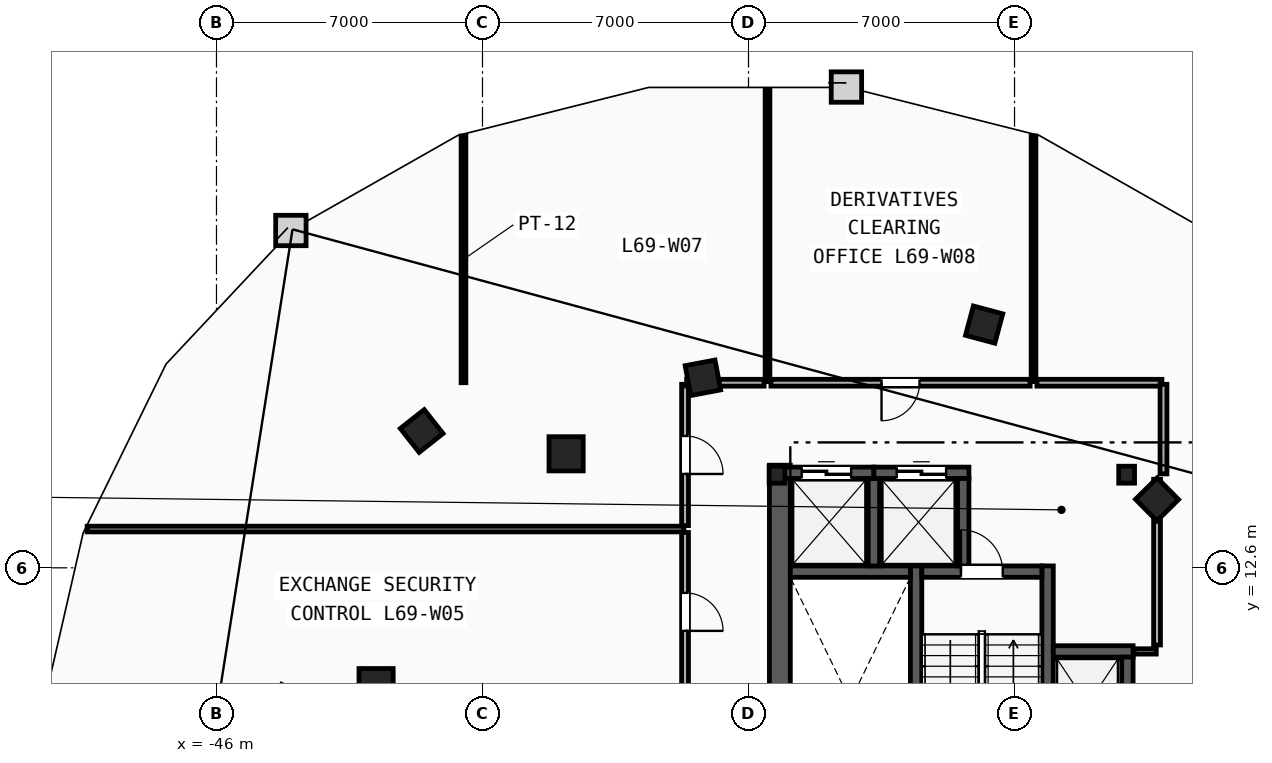
"""IFC4 building model, lengths in metres.
Left out: names, types, materials, properties, quantities, classifications, styles, units other than length and angle.
Written with IfcOpenShell. Run it as: python <this file> out.ifc"""

import sys

from ifc_helpers import new_model, si_unit, direction, frame, frame_2d, origin, origin_2d, place, context, subcontext, project, spatial, rectangle, i_section, extrude, element, fill, save


model = new_model("IFC4")
c1 = context("Model", 3, precision=1e-05, world=origin(), true_north=direction((0.0, 1.0)))
c2 = subcontext(c1, "Body", "Model", "MODEL_VIEW")
j1 = project(units=[si_unit("LENGTHUNIT", "METRE"), si_unit("PLANEANGLEUNIT", "RADIAN")], contexts=[c1])
p1 = place(None, origin())
s1 = spatial("IfcSite", under=j1, at=p1, CompositionType="ELEMENT")
p2 = place(p1, origin())
s2 = spatial("IfcBuilding", under=s1, at=p2, CompositionType="ELEMENT")
p3 = place(p2, frame((0.0, 0.0, 261.2)))
s3 = spatial("IfcBuildingStorey", under=s2, at=p3, CompositionType="ELEMENT", Elevation=261.2)
for number, where, z_axis, x_axis in (
    (1, (-22.05, 15.05, 0.0), (0.0, 0.0, 1.0), (1.0, 0.0, 0.0)),
    (2, (-31.25, 15.05, 0.0), (0.0, 0.0, 1.0), (1.0, 0.0, 0.0)),
):
    element("IfcColumn", number, at=place(p3, frame(where, z_axis=z_axis, x_axis=x_axis)), inside=s3, PredefinedType="COLUMN", context=c2, shape_type="SweptSolid", body=[
        extrude(i_section(OverallWidth=0.416, OverallDepth=0.446, WebThickness=0.039, FlangeThickness=0.063, FilletRadius=0.018, at=origin_2d()), origin(), (0.0, 0.0, 1.0), 3.6),
    ])
for number, where, z_axis, x_axis in (
    (3, (-41.8, 9.5, 0.0), (0.0, 0.0, 1.0), (1.0, 0.0, 0.0)),
    (4, (-36.8, 15.6, 0.0), (0.0, 0.0, 1.0), (1.0, 0.0, 0.0)),
):
    element("IfcColumn", number, at=place(p3, frame(where, z_axis=z_axis, x_axis=x_axis)), inside=s3, PredefinedType="COLUMN", context=c2, shape_type="SweptSolid", body=[
        extrude(rectangle(XDim=0.9, YDim=0.9, at=origin_2d()), origin(), (0.0, 0.0, 1.0), 3.6),
    ])
for number, where, z_axis, x_axis in (
    (5, (-21.25, 14.4, 0.0), (0.0, 0.0, 1.0), (-0.703, 0.711, 0.0)),
    (6, (-25.8, 19.0, 0.0), (0.0, 0.0, 1.0), (-0.966, 0.259, 0.0)),
    (7, (-33.2, 17.6, 0.0), (0.0, 0.0, 1.0), (-0.983, -0.186, 0.0)),
    (8, (-40.6, 16.2, 0.0), (0.0, 0.0, 1.0), (-0.785, -0.619, 0.0)),
):
    element("IfcColumn", number, at=place(p3, frame(where, z_axis=z_axis, x_axis=x_axis)), inside=s3, PredefinedType="COLUMN", context=c2, shape_type="SweptSolid", body=[
        extrude(rectangle(XDim=0.8, YDim=0.8, at=origin_2d()), origin(), (0.0, 0.0, 1.0), 3.6),
    ])
p4 = place(p3, frame((-31.175, 1.97, 0.0), z_axis=(0.0, 0.0, 1.0), x_axis=(0.0, 1.0, 0.0)))
e9 = element("IfcWall", 9, at=p4, inside=s3, PredefinedType="SHEAR", context=c2, shape_type="SweptSolid", body=[
    extrude(rectangle(XDim=13.33, YDim=0.55, at=frame_2d((6.665, 0.0))), origin(), (0.0, 0.0, 1.0), 3.34),
])
for number, where, z_axis, x_axis in (
    (10, (-27.59, 1.97, 0.0), (0.0, 0.0, 1.0), (0.0, 1.0, 0.0)),
    (11, (-24.13, 1.97, 0.0), (0.0, 0.0, 1.0), (0.0, 1.0, 0.0)),
):
    element("IfcWall", number, at=place(p3, frame(where, z_axis=z_axis, x_axis=x_axis)), inside=s3, PredefinedType="SHEAR", context=c2, shape_type="SweptSolid", body=[
        extrude(rectangle(XDim=10.68, YDim=0.3, at=frame_2d((5.34, 0.0))), origin(), (0.0, 0.0, 1.0), 3.34),
    ])
p5 = place(p3, frame((-30.9, 12.5, 0.0), z_axis=(0.0, 0.0, 1.0), x_axis=(1.0, 0.0, 0.0)))
e12 = element("IfcWall", 12, at=p5, inside=s3, PredefinedType="SHEAR", context=c2, shape_type="SweptSolid", body=[
    extrude(rectangle(XDim=3.16, YDim=0.3, at=frame_2d((1.58, 0.0))), origin(), (0.0, 0.0, 1.0), 3.34),
])
p6 = place(p3, frame((-27.44, 12.5, 0.0), z_axis=(0.0, 0.0, 1.0), x_axis=(1.0, 0.0, 0.0)))
e13 = element("IfcWall", 13, at=p6, inside=s3, PredefinedType="SHEAR", context=c2, shape_type="SweptSolid", body=[
    extrude(rectangle(XDim=3.16, YDim=0.3, at=frame_2d((1.58, 0.0))), origin(), (0.0, 0.0, 1.0), 3.34),
])
p7 = place(p6, frame((1.03, 0.0, 0.0)))
e14 = element("IfcOpeningElement", 14, at=p7, cuts=e13, PredefinedType="OPENING", context=c2, shape_type="SweptSolid", body=[
    extrude(rectangle(XDim=1.1, YDim=2.15, at=frame_2d((0.55, 1.075))), frame((0.0, 0.16, 0.0), z_axis=(0.0, -1.0, 0.0), x_axis=(1.0, 0.0, 0.0)), (0.0, 0.0, 1.0), 0.32),
])
p8 = place(p3, frame((-23.98, 10.4, 0.0), z_axis=(0.0, 0.0, 1.0), x_axis=(1.0, 0.0, 0.0)))
e15 = element("IfcWall", 15, at=p8, inside=s3, PredefinedType="SHEAR", context=c2, shape_type="SweptSolid", body=[
    extrude(rectangle(XDim=2.1, YDim=0.3, at=frame_2d((1.05, 0.0))), origin(), (0.0, 0.0, 1.0), 3.34),
])
p9 = place(p3, frame((-22.03, 7.75, 0.0), z_axis=(0.0, 0.0, 1.0), x_axis=(0.0, 1.0, 0.0)))
e16 = element("IfcWall", 16, at=p9, inside=s3, PredefinedType="SHEAR", context=c2, shape_type="SweptSolid", body=[
    extrude(rectangle(XDim=2.5, YDim=0.3, at=frame_2d((1.25, 0.0))), origin(), (0.0, 0.0, 1.0), 3.34),
])
p10 = place(p3, frame((-31.2, 15.1, 0.0), z_axis=(0.0, 0.0, 1.0), x_axis=(1.0, 0.0, 0.0)))
e17 = element("IfcWall", 17, at=p10, inside=s3, PredefinedType="SHEAR", context=c2, shape_type="SweptSolid", body=[
    extrude(rectangle(XDim=2.5, YDim=0.3, at=frame_2d((1.25, 0.0))), origin(), (0.0, 0.0, 1.0), 3.34),
])
p11 = place(p10, frame((0.6, 0.0, 0.0)))
e18 = element("IfcOpeningElement", 18, at=p11, cuts=e17, PredefinedType="OPENING", context=c2, shape_type="SweptSolid", body=[
    extrude(rectangle(XDim=1.3, YDim=2.2, at=frame_2d((0.65, 1.1))), frame((0.0, 0.16, 0.0), z_axis=(0.0, -1.0, 0.0), x_axis=(1.0, 0.0, 0.0)), (0.0, 0.0, 1.0), 0.32),
])
p12 = place(p3, frame((-28.7, 12.65, 0.0), z_axis=(0.0, 0.0, 1.0), x_axis=(0.0, 1.0, 0.0)))
e19 = element("IfcWall", 19, at=p12, inside=s3, PredefinedType="SHEAR", context=c2, shape_type="SweptSolid", body=[
    extrude(rectangle(XDim=2.3, YDim=0.3, at=frame_2d((1.15, 0.0))), origin(), (0.0, 0.0, 1.0), 3.34),
])
p13 = place(p3, frame((-28.7, 15.1, 0.0), z_axis=(0.0, 0.0, 1.0), x_axis=(1.0, 0.0, 0.0)))
e20 = element("IfcWall", 20, at=p13, inside=s3, PredefinedType="SHEAR", context=c2, shape_type="SweptSolid", body=[
    extrude(rectangle(XDim=2.5, YDim=0.3, at=frame_2d((1.25, 0.0))), origin(), (0.0, 0.0, 1.0), 3.34),
])
p14 = place(p13, frame((0.6, 0.0, 0.0)))
e21 = element("IfcOpeningElement", 21, at=p14, cuts=e20, PredefinedType="OPENING", context=c2, shape_type="SweptSolid", body=[
    extrude(rectangle(XDim=1.3, YDim=2.2, at=frame_2d((0.65, 1.1))), frame((0.0, 0.16, 0.0), z_axis=(0.0, -1.0, 0.0), x_axis=(1.0, 0.0, 0.0)), (0.0, 0.0, 1.0), 0.32),
])
p15 = place(p3, frame((-26.35, 12.65, 0.0), z_axis=(0.0, 0.0, 1.0), x_axis=(0.0, 1.0, 0.0)))
e22 = element("IfcWall", 22, at=p15, inside=s3, PredefinedType="SHEAR", context=c2, shape_type="SweptSolid", body=[
    extrude(rectangle(XDim=2.3, YDim=0.3, at=frame_2d((1.15, 0.0))), origin(), (0.0, 0.0, 1.0), 3.34),
])
p16 = place(p3, frame((-21.86, 10.4, 0.0), z_axis=(0.0, 0.0, 1.0), x_axis=(1.0, 0.0, 0.0)))
e23 = element("IfcWall", 23, at=p16, inside=s3, PredefinedType="PARTITIONING", context=c2, shape_type="SweptSolid", body=[
    extrude(rectangle(XDim=0.59, YDim=0.14, at=frame_2d((0.295, 0.0))), origin(), (0.0, 0.0, 1.0), 3.34),
])
p17 = place(p3, frame((-21.25, 10.57, 0.0), z_axis=(0.0, 0.0, 1.0), x_axis=(0.0, 1.0, 0.0)))
e24 = element("IfcWall", 24, at=p17, inside=s3, PredefinedType="PARTITIONING", context=c2, shape_type="SweptSolid", body=[
    extrude(rectangle(XDim=4.36, YDim=0.18, at=frame_2d((2.18, 0.0))), origin(), (0.0, 0.0, 1.0), 3.34),
])
p18 = place(p3, frame((-49.404, 13.62, 0.0), z_axis=(0.0, 0.0, 1.0), x_axis=(1.0, 0.0, 0.0)))
e25 = element("IfcWall", 25, at=p18, inside=s3, PredefinedType="PARTITIONING", context=c2, shape_type="SweptSolid", body=[
    extrude(rectangle(XDim=15.704, YDim=0.15, at=frame_2d((7.852, 0.0))), origin(), (0.0, 0.0, 1.0), 3.34),
])
p19 = place(p3, frame((-39.5, 17.47, 0.0), z_axis=(0.0, 0.0, 1.0), x_axis=(0.0, 1.0, 0.0)))
e26 = element("IfcWall", 26, at=p19, inside=s3, PredefinedType="PARTITIONING", context=c2, shape_type="SweptSolid", body=[
    extrude(rectangle(XDim=6.493, YDim=0.125, at=frame_2d((3.246, 0.0))), origin(), (0.0, 0.0, 1.0), 3.34),
])
p20 = place(p3, frame((-31.5, 17.5, 0.0), z_axis=(0.0, 0.0, 1.0), x_axis=(0.0, 1.0, 0.0)))
e27 = element("IfcWall", 27, at=p20, inside=s3, PredefinedType="PARTITIONING", context=c2, shape_type="SweptSolid", body=[
    extrude(rectangle(XDim=7.69, YDim=0.125, at=frame_2d((3.845, 0.0))), origin(), (0.0, 0.0, 1.0), 3.34),
])
p21 = place(p3, frame((-24.5, 17.5, 0.0), z_axis=(0.0, 0.0, 1.0), x_axis=(0.0, 1.0, 0.0)))
e28 = element("IfcWall", 28, at=p21, inside=s3, PredefinedType="PARTITIONING", context=c2, shape_type="SweptSolid", body=[
    extrude(rectangle(XDim=6.463, YDim=0.125, at=frame_2d((3.231, 0.0))), origin(), (0.0, 0.0, 1.0), 3.34),
])
p22 = place(p3, frame((-33.67, 13.53, 0.0), z_axis=(0.0, 0.0, 1.0), x_axis=(0.0, -1.0, 0.0)))
e29 = element("IfcWall", 29, at=p22, inside=s3, PredefinedType="PARTITIONING", context=c2, shape_type="SweptSolid", body=[
    extrude(rectangle(XDim=4.179, YDim=0.18, at=frame_2d((2.089, 0.0))), origin(), (0.0, 0.0, 1.0), 3.34),
])
p23 = place(p22, frame((1.589, 0.0, 0.0)))
e30 = element("IfcOpeningElement", 30, at=p23, cuts=e29, PredefinedType="OPENING", context=c2, shape_type="SweptSolid", body=[
    extrude(rectangle(XDim=1.0, YDim=2.15, at=frame_2d((0.5, 1.075))), frame((0.0, 0.1, 0.0), z_axis=(0.0, -1.0, 0.0), x_axis=(1.0, 0.0, 0.0)), (0.0, 0.0, 1.0), 0.2),
])
p24 = place(p3, frame((-21.122, 17.47, 0.0), z_axis=(0.0, 0.0, 1.0), x_axis=(-1.0, 0.0, 0.0)))
e31 = element("IfcWall", 31, at=p24, inside=s3, PredefinedType="PARTITIONING", context=c2, shape_type="SweptSolid", body=[
    extrude(rectangle(XDim=3.288, YDim=0.18, at=frame_2d((1.644, 0.0))), origin(), (0.0, 0.0, 1.0), 3.34),
])
p25 = place(p3, frame((-21.08, 15.072, 0.0), z_axis=(0.0, 0.0, 1.0), x_axis=(0.0, 1.0, 0.0)))
e32 = element("IfcWall", 32, at=p25, inside=s3, PredefinedType="PARTITIONING", context=c2, shape_type="SweptSolid", body=[
    extrude(rectangle(XDim=2.357, YDim=0.18, at=frame_2d((1.178, 0.0))), origin(), (0.0, 0.0, 1.0), 3.34),
])
p26 = place(p3, frame((-33.67, 17.428, 0.0), z_axis=(0.0, 0.0, 1.0), x_axis=(0.0, -1.0, 0.0)))
e33 = element("IfcWall", 33, at=p26, inside=s3, PredefinedType="PARTITIONING", context=c2, shape_type="SweptSolid", body=[
    extrude(rectangle(XDim=3.719, YDim=0.18, at=frame_2d((1.859, 0.0))), origin(), (0.0, 0.0, 1.0), 3.34),
])
p27 = place(p26, frame((1.359, 0.0, 0.0)))
e34 = element("IfcOpeningElement", 34, at=p27, cuts=e33, PredefinedType="OPENING", context=c2, shape_type="SweptSolid", body=[
    extrude(rectangle(XDim=1.0, YDim=2.15, at=frame_2d((0.5, 1.075))), frame((0.0, 0.1, 0.0), z_axis=(0.0, -1.0, 0.0), x_axis=(1.0, 0.0, 0.0)), (0.0, 0.0, 1.0), 0.2),
])
p28 = place(p3, frame((-31.59, 17.47, 0.0), z_axis=(0.0, 0.0, 1.0), x_axis=(-1.0, 0.0, 0.0)))
e35 = element("IfcWall", 35, at=p28, inside=s3, PredefinedType="PARTITIONING", context=c2, shape_type="SweptSolid", body=[
    extrude(rectangle(XDim=2.038, YDim=0.18, at=frame_2d((1.019, 0.0))), origin(), (0.0, 0.0, 1.0), 3.34),
])
p29 = place(p3, frame((-24.59, 17.47, 0.0), z_axis=(0.0, 0.0, 1.0), x_axis=(-1.0, 0.0, 0.0)))
e36 = element("IfcWall", 36, at=p29, inside=s3, PredefinedType="PARTITIONING", context=c2, shape_type="SweptSolid", body=[
    extrude(rectangle(XDim=6.82, YDim=0.18, at=frame_2d((3.41, 0.0))), origin(), (0.0, 0.0, 1.0), 3.34),
])
p30 = place(p29, frame((2.91, 0.0, 0.0)))
e37 = element("IfcOpeningElement", 37, at=p30, cuts=e36, PredefinedType="OPENING", context=c2, shape_type="SweptSolid", body=[
    extrude(rectangle(XDim=1.0, YDim=2.15, at=frame_2d((0.5, 1.075))), frame((0.0, 0.1, 0.0), z_axis=(0.0, -1.0, 0.0), x_axis=(1.0, 0.0, 0.0)), (0.0, 0.0, 1.0), 0.2),
])
p31 = place(p7, origin())
e38 = element("IfcDoor", 38, at=p31, inside=s3, OperationType="SINGLE_SWING_LEFT", PredefinedType="DOOR", context=c2, shape_type="SweptSolid", body=[
    extrude(rectangle(XDim=1.1, YDim=2.15, at=frame_2d((0.55, 1.075))), frame((0.0, 0.025, 0.0), z_axis=(0.0, -1.0, 0.0), x_axis=(1.0, 0.0, 0.0)), (0.0, 0.0, 1.0), 0.05),
])
fill(e14, e38)
p32 = place(p11, origin())
e39 = element("IfcDoor", 39, at=p32, inside=s3, OperationType="SLIDING_TO_LEFT", PredefinedType="TRAPDOOR", context=c2, shape_type="SweptSolid", body=[
    extrude(rectangle(XDim=1.3, YDim=2.2, at=frame_2d((0.65, 1.1))), frame((0.0, 0.025, 0.0), z_axis=(0.0, -1.0, 0.0), x_axis=(1.0, 0.0, 0.0)), (0.0, 0.0, 1.0), 0.05),
])
fill(e18, e39)
p33 = place(p14, origin())
e40 = element("IfcDoor", 40, at=p33, inside=s3, OperationType="SLIDING_TO_LEFT", PredefinedType="TRAPDOOR", context=c2, shape_type="SweptSolid", body=[
    extrude(rectangle(XDim=1.3, YDim=2.2, at=frame_2d((0.65, 1.1))), frame((0.0, 0.025, 0.0), z_axis=(0.0, -1.0, 0.0), x_axis=(1.0, 0.0, 0.0)), (0.0, 0.0, 1.0), 0.05),
])
fill(e21, e40)
p34 = place(p30, origin())
e41 = element("IfcDoor", 41, at=p34, inside=s3, OperationType="SINGLE_SWING_RIGHT", PredefinedType="DOOR", context=c2, shape_type="SweptSolid", body=[
    extrude(rectangle(XDim=1.0, YDim=2.15, at=frame_2d((0.5, 1.075))), frame((0.0, 0.025, 0.0), z_axis=(0.0, -1.0, 0.0), x_axis=(1.0, 0.0, 0.0)), (0.0, 0.0, 1.0), 0.05),
])
fill(e37, e41)
p35 = place(p23, origin())
e42 = element("IfcDoor", 42, at=p35, inside=s3, OperationType="SINGLE_SWING_RIGHT", PredefinedType="DOOR", context=c2, shape_type="SweptSolid", body=[
    extrude(rectangle(XDim=1.0, YDim=2.15, at=frame_2d((0.5, 1.075))), frame((0.0, 0.025, 0.0), z_axis=(0.0, -1.0, 0.0), x_axis=(1.0, 0.0, 0.0)), (0.0, 0.0, 1.0), 0.05),
])
fill(e30, e42)
p36 = place(p27, origin())
e43 = element("IfcDoor", 43, at=p36, inside=s3, OperationType="SINGLE_SWING_RIGHT", PredefinedType="DOOR", context=c2, shape_type="SweptSolid", body=[
    extrude(rectangle(XDim=1.0, YDim=2.15, at=frame_2d((0.5, 1.075))), frame((0.0, 0.025, 0.0), z_axis=(0.0, -1.0, 0.0), x_axis=(1.0, 0.0, 0.0)), (0.0, 0.0, 1.0), 0.05),
])
fill(e34, e43)
save(model, sys.argv[1])
